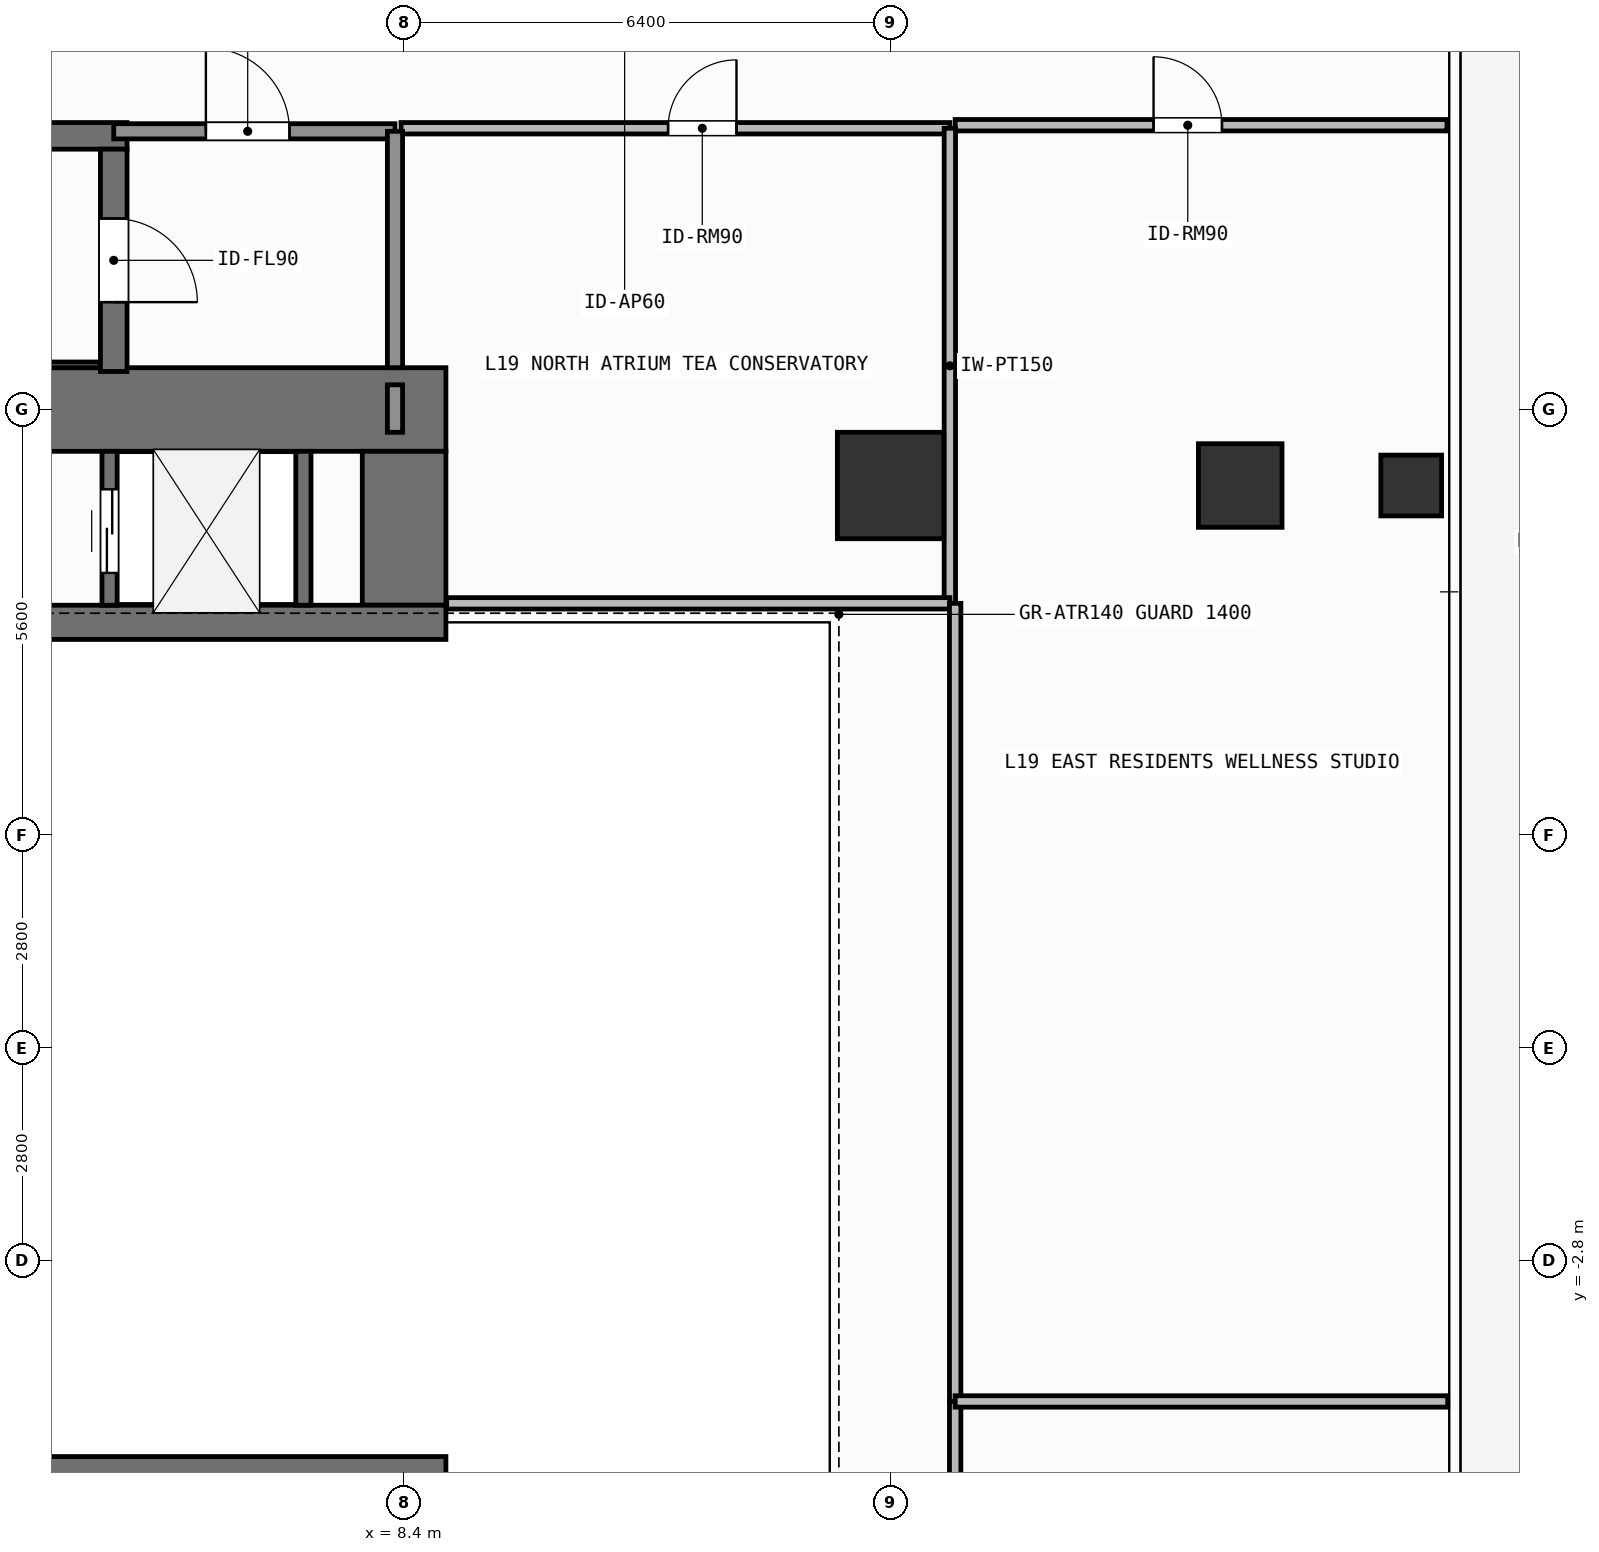
"""IFC4 building model, lengths in metres.
Left out: names, types, materials, properties, quantities, classifications, styles, units other than length and angle.
Written with IfcOpenShell. Run it as: python <this file> out.ifc"""

import sys

from ifc_helpers import new_model, si_unit, direction, frame, frame_2d, origin, origin_2d, place, context, subcontext, project, spatial, rectangle, hollow_rectangle, extrude, element, fill, save


model = new_model("IFC4")
c1 = context("Model", 3, precision=1e-05, world=origin(), true_north=direction((0.0, 1.0)))
c2 = subcontext(c1, "Body", "Model", "MODEL_VIEW")
j1 = project(units=[si_unit("LENGTHUNIT", "METRE"), si_unit("PLANEANGLEUNIT", "RADIAN")], contexts=[c1])
p1 = place(None, origin())
s1 = spatial("IfcSite", under=j1, at=p1, CompositionType="ELEMENT")
p2 = place(p1, origin())
s2 = spatial("IfcBuilding", under=s1, at=p2, CompositionType="ELEMENT")
p3 = place(p2, frame((0.0, 0.0, 73.5)))
s3 = spatial("IfcBuildingStorey", under=s2, at=p3, CompositionType="ELEMENT", Elevation=73.5)
p4 = place(p3, frame((-7.55, 8.4, 0.0), z_axis=(0.0, 0.0, 1.0), x_axis=(1.0, 0.0, 0.0)))
e1 = element("IfcWall", 1, at=p4, inside=s3, PredefinedType="SHEAR", context=c2, shape_type="SweptSolid", body=[
    extrude(rectangle(XDim=16.5, YDim=1.1, at=frame_2d((8.25, 0.0))), origin(), (0.0, 0.0, 1.0), 3.9),
])
p5 = place(p3, frame((8.4, 5.825, 0.0), z_axis=(0.0, 0.0, 1.0), x_axis=(0.0, 1.0, 0.0)))
e2 = element("IfcWall", 2, at=p5, inside=s3, PredefinedType="SHEAR", context=c2, shape_type="SweptSolid", body=[
    extrude(rectangle(XDim=2.025, YDim=1.1, at=frame_2d((1.013, 0.0))), origin(), (0.0, 0.0, 1.0), 3.9),
])
for number, where, z_axis, x_axis in (
    (3, (3.045, -5.6, 0.0), (0.0, 0.0, 1.0), (1.0, 0.0, 0.0)),
    (4, (3.045, 5.6, 0.0), (0.0, 0.0, 1.0), (1.0, 0.0, 0.0)),
):
    element("IfcWall", number, at=place(p3, frame(where, z_axis=z_axis, x_axis=x_axis)), inside=s3, PredefinedType="SHEAR", context=c2, shape_type="SweptSolid", body=[
        extrude(rectangle(XDim=5.905, YDim=0.45, at=frame_2d((2.953, 0.0))), origin(), (0.0, 0.0, 1.0), 3.9),
    ])
p6 = place(p3, frame((-2.555, 12.0, 0.0), z_axis=(0.0, 0.0, 1.0), x_axis=(1.0, 0.0, 0.0)))
e5 = element("IfcWall", 5, at=p6, inside=s3, PredefinedType="SHEAR", context=c2, shape_type="SweptSolid", body=[
    extrude(rectangle(XDim=7.31, YDim=0.35, at=frame_2d((3.655, 0.0))), origin(), (0.0, 0.0, 1.0), 3.9),
])
p7 = place(p3, frame((-2.2, 8.988, 0.0), z_axis=(0.0, 0.0, 1.0), x_axis=(1.0, 0.0, 0.0)))
e6 = element("IfcWall", 6, at=p7, inside=s3, PredefinedType="SHEAR", context=c2, shape_type="SweptSolid", body=[
    extrude(rectangle(XDim=6.6, YDim=0.075, at=frame_2d((3.3, 0.0))), origin(), (0.0, 0.0, 1.0), 3.9),
])
p8 = place(p3, frame((4.58, 11.825, 0.0), z_axis=(0.0, 0.0, 1.0), x_axis=(0.0, -1.0, 0.0)))
e7 = element("IfcWall", 7, at=p8, inside=s3, PredefinedType="SHEAR", context=c2, shape_type="SweptSolid", body=[
    extrude(rectangle(XDim=2.925, YDim=0.35, at=frame_2d((1.462, 0.0))), origin(), (0.0, 0.0, 1.0), 3.9),
])
p9 = place(p8, frame((0.913, 0.0, 0.0)))
e8 = element("IfcOpeningElement", 8, at=p9, cuts=e7, PredefinedType="OPENING", context=c2, shape_type="SweptSolid", body=[
    extrude(rectangle(XDim=1.1, YDim=2.15, at=frame_2d((0.55, 1.075))), frame((0.0, 0.185, 0.0), z_axis=(0.0, -1.0, 0.0), x_axis=(1.0, 0.0, 0.0)), (0.0, 0.0, 1.0), 0.37),
])
p10 = place(p3, frame((14.8, 7.4, 0.0), z_axis=(0.0, 0.0, 1.0), x_axis=(1.0, 0.0, 0.0)))
e9 = element("IfcColumn", 9, at=p10, inside=s3, PredefinedType="COLUMN", context=c2, shape_type="SweptSolid", body=[
    extrude(rectangle(XDim=1.4, YDim=1.4, at=origin_2d()), origin(), (0.0, 0.0, 1.0), 3.9),
])
p11 = place(p3, frame((19.4, 7.4, 0.0), z_axis=(0.0, 0.0, 1.0), x_axis=(1.0, 0.0, 0.0)))
e10 = element("IfcColumn", 10, at=p11, inside=s3, PredefinedType="COLUMN", context=c2, shape_type="SweptSolid", body=[
    extrude(rectangle(XDim=1.1, YDim=1.1, at=origin_2d()), origin(), (0.0, 0.0, 1.0), 3.9),
])
p12 = place(p3, frame((21.65, 7.4, 0.0), z_axis=(0.0, 0.0, 1.0), x_axis=(1.0, 0.0, 0.0)))
e11 = element("IfcColumn", 11, at=p12, inside=s3, PredefinedType="COLUMN", context=c2, shape_type="SweptSolid", body=[
    extrude(hollow_rectangle(XDim=0.8, YDim=0.8, WallThickness=0.036, at=origin_2d()), origin(), (0.0, 0.0, 1.0), 3.9),
])
p13 = place(p3, frame((4.525, 5.825, 0.0), z_axis=(0.0, 0.0, 1.0), x_axis=(0.0, 1.0, 0.0)))
e12 = element("IfcWall", 12, at=p13, inside=s3, PredefinedType="SHEAR", context=c2, shape_type="SweptSolid", body=[
    extrude(rectangle(XDim=2.025, YDim=0.2, at=frame_2d((1.013, 0.0))), origin(), (0.0, 0.0, 1.0), 3.6),
])
p14 = place(p13, frame((0.425, 0.0, 0.0)))
e13 = element("IfcOpeningElement", 13, at=p14, cuts=e12, PredefinedType="OPENING", context=c2, shape_type="SweptSolid", body=[
    extrude(rectangle(XDim=1.1, YDim=2.2, at=frame_2d((0.55, 1.1))), frame((0.0, 0.11, 0.0), z_axis=(0.0, -1.0, 0.0), x_axis=(1.0, 0.0, 0.0)), (0.0, 0.0, 1.0), 0.22),
])
p15 = place(p3, frame((7.075, 5.825, 0.0), z_axis=(0.0, 0.0, 1.0), x_axis=(0.0, 1.0, 0.0)))
e14 = element("IfcWall", 14, at=p15, inside=s3, PredefinedType="SHEAR", context=c2, shape_type="SweptSolid", body=[
    extrude(rectangle(XDim=2.025, YDim=0.2, at=frame_2d((1.013, 0.0))), origin(), (0.0, 0.0, 1.0), 3.6),
])
p16 = place(p3, frame((4.58, 12.06, 0.0), z_axis=(0.0, 0.0, 1.0), x_axis=(1.0, 0.0, 0.0)))
e15 = element("IfcWall", 15, at=p16, inside=s3, PredefinedType="SOLIDWALL", context=c2, shape_type="SweptSolid", body=[
    extrude(rectangle(XDim=3.7, YDim=0.2, at=frame_2d((1.85, 0.0))), origin(), (0.0, 0.0, 1.0), 3.6),
])
p17 = place(p16, frame((1.212, 0.0, 0.0)))
e16 = element("IfcOpeningElement", 16, at=p17, cuts=e15, PredefinedType="OPENING", context=c2, shape_type="SweptSolid", body=[
    extrude(rectangle(XDim=1.1, YDim=2.15, at=frame_2d((0.55, 1.075))), frame((0.0, 0.11, 0.0), z_axis=(0.0, -1.0, 0.0), x_axis=(1.0, 0.0, 0.0)), (0.0, 0.0, 1.0), 0.22),
])
p18 = place(p3, frame((8.36, 12.1, 0.0), z_axis=(0.0, 0.0, 1.0), x_axis=(1.0, 0.0, 0.0)))
e17 = element("IfcWall", 17, at=p18, inside=s3, PredefinedType="PARTITIONING", context=c2, shape_type="SweptSolid", body=[
    extrude(rectangle(XDim=7.22, YDim=0.15, at=frame_2d((3.61, 0.0))), origin(), (0.0, 0.0, 1.0), 3.6),
])
p19 = place(p18, frame((3.513, 0.0, 0.0)))
e18 = element("IfcOpeningElement", 18, at=p19, cuts=e17, PredefinedType="OPENING", context=c2, shape_type="SweptSolid", body=[
    extrude(rectangle(XDim=0.9, YDim=2.1, at=frame_2d((0.45, 1.05))), frame((0.0, 0.085, 0.0), z_axis=(0.0, -1.0, 0.0), x_axis=(1.0, 0.0, 0.0)), (0.0, 0.0, 1.0), 0.17),
])
p20 = place(p3, frame((15.65, 12.14, 0.0), z_axis=(0.0, 0.0, 1.0), x_axis=(1.0, 0.0, 0.0)))
e19 = element("IfcWall", 19, at=p20, inside=s3, PredefinedType="PARTITIONING", context=c2, shape_type="SweptSolid", body=[
    extrude(rectangle(XDim=6.47, YDim=0.15, at=frame_2d((3.235, 0.0))), origin(), (0.0, 0.0, 1.0), 3.6),
])
p21 = place(p20, frame((2.61, 0.0, 0.0)))
e20 = element("IfcOpeningElement", 20, at=p21, cuts=e19, PredefinedType="OPENING", context=c2, shape_type="SweptSolid", body=[
    extrude(rectangle(XDim=0.9, YDim=2.1, at=frame_2d((0.45, 1.05))), frame((0.0, 0.085, 0.0), z_axis=(0.0, -1.0, 0.0), x_axis=(1.0, 0.0, 0.0)), (0.0, 0.0, 1.0), 0.17),
])
p22 = place(p3, frame((8.28, 8.95, 0.0), z_axis=(0.0, 0.0, 1.0), x_axis=(0.0, 1.0, 0.0)))
e21 = element("IfcWall", 21, at=p22, inside=s3, PredefinedType="SOLIDWALL", context=c2, shape_type="SweptSolid", body=[
    extrude(rectangle(XDim=3.11, YDim=0.2, at=frame_2d((1.555, 0.0))), origin(), (0.0, 0.0, 1.0), 3.6),
])
p23 = place(p3, frame((8.28, 8.1, 0.0), z_axis=(0.0, 0.0, 1.0), x_axis=(0.0, 1.0, 0.0)))
e22 = element("IfcWall", 22, at=p23, inside=s3, PredefinedType="SOLIDWALL", context=c2, shape_type="SweptSolid", body=[
    extrude(rectangle(XDim=0.625, YDim=0.2, at=frame_2d((0.312, 0.0))), origin(), (0.0, 0.0, 1.0), 3.6),
])
p24 = place(p3, frame((15.58, 5.85, 0.0), z_axis=(0.0, 0.0, 1.0), x_axis=(0.0, 1.0, 0.0)))
e23 = element("IfcWall", 23, at=p24, inside=s3, PredefinedType="PARTITIONING", context=c2, shape_type="SweptSolid", body=[
    extrude(rectangle(XDim=6.25, YDim=0.15, at=frame_2d((3.125, 0.0))), origin(), (0.0, 0.0, 1.0), 3.6),
])
p25 = place(p3, frame((8.96, 5.85, 0.0), z_axis=(0.0, 0.0, 1.0), x_axis=(1.0, 0.0, 0.0)))
e24 = element("IfcWall", 24, at=p25, inside=s3, PredefinedType="PARTITIONING", context=c2, shape_type="SweptSolid", body=[
    extrude(rectangle(XDim=6.62, YDim=0.15, at=frame_2d((3.31, 0.0))), origin(), (0.0, 0.0, 1.0), 3.6),
])
p26 = place(p3, frame((15.65, -5.85, 0.0), z_axis=(0.0, 0.0, 1.0), x_axis=(0.0, 1.0, 0.0)))
e25 = element("IfcWall", 25, at=p26, inside=s3, PredefinedType="PARTITIONING", context=c2, shape_type="SweptSolid", body=[
    extrude(rectangle(XDim=1.2, YDim=0.15, at=frame_2d((0.6, 0.0))), origin(), (0.0, 0.0, 1.0), 3.6),
])
p27 = place(p3, frame((15.65, -4.65, 0.0), z_axis=(0.0, 0.0, 1.0), x_axis=(0.0, 1.0, 0.0)))
e26 = element("IfcWall", 26, at=p27, inside=s3, PredefinedType="PARTITIONING", context=c2, shape_type="SweptSolid", body=[
    extrude(rectangle(XDim=10.5, YDim=0.15, at=frame_2d((5.25, 0.0))), origin(), (0.0, 0.0, 1.0), 3.6),
])
p28 = place(p3, frame((15.65, -4.65, 0.0), z_axis=(0.0, 0.0, 1.0), x_axis=(1.0, 0.0, 0.0)))
e27 = element("IfcWall", 27, at=p28, inside=s3, PredefinedType="PARTITIONING", context=c2, shape_type="SweptSolid", body=[
    extrude(rectangle(XDim=6.48, YDim=0.15, at=frame_2d((3.24, 0.0))), origin(), (0.0, 0.0, 1.0), 3.6),
])
p29 = place(p14, origin())
e28 = element("IfcDoor", 28, at=p29, inside=s3, OperationType="SLIDING_TO_LEFT", PredefinedType="DOOR", context=c2, shape_type="SweptSolid", body=[
    extrude(rectangle(XDim=1.1, YDim=2.2, at=frame_2d((0.55, 1.1))), frame((0.0, 0.025, 0.0), z_axis=(0.0, -1.0, 0.0), x_axis=(1.0, 0.0, 0.0)), (0.0, 0.0, 1.0), 0.05),
])
fill(e13, e28)
p30 = place(p9, origin())
e29 = element("IfcDoor", 29, at=p30, inside=s3, OperationType="SINGLE_SWING_RIGHT", PredefinedType="DOOR", context=c2, shape_type="SweptSolid", body=[
    extrude(rectangle(XDim=1.1, YDim=2.15, at=frame_2d((0.55, 1.075))), frame((0.0, 0.025, 0.0), z_axis=(0.0, -1.0, 0.0), x_axis=(1.0, 0.0, 0.0)), (0.0, 0.0, 1.0), 0.05),
])
fill(e8, e29)
p31 = place(p17, origin())
e30 = element("IfcDoor", 30, at=p31, inside=s3, OperationType="SINGLE_SWING_LEFT", PredefinedType="DOOR", context=c2, shape_type="SweptSolid", body=[
    extrude(rectangle(XDim=1.1, YDim=2.15, at=frame_2d((0.55, 1.075))), frame((0.0, 0.025, 0.0), z_axis=(0.0, -1.0, 0.0), x_axis=(1.0, 0.0, 0.0)), (0.0, 0.0, 1.0), 0.05),
])
fill(e16, e30)
p32 = place(p19, origin())
e31 = element("IfcDoor", 31, at=p32, inside=s3, OperationType="SINGLE_SWING_RIGHT", PredefinedType="DOOR", context=c2, shape_type="SweptSolid", body=[
    extrude(rectangle(XDim=0.9, YDim=2.1, at=frame_2d((0.45, 1.05))), frame((0.0, 0.025, 0.0), z_axis=(0.0, -1.0, 0.0), x_axis=(1.0, 0.0, 0.0)), (0.0, 0.0, 1.0), 0.05),
])
fill(e18, e31)
p33 = place(p21, origin())
e32 = element("IfcDoor", 32, at=p33, inside=s3, OperationType="SINGLE_SWING_LEFT", PredefinedType="DOOR", context=c2, shape_type="SweptSolid", body=[
    extrude(rectangle(XDim=0.9, YDim=2.1, at=frame_2d((0.45, 1.05))), frame((0.0, 0.025, 0.0), z_axis=(0.0, -1.0, 0.0), x_axis=(1.0, 0.0, 0.0)), (0.0, 0.0, 1.0), 0.05),
])
fill(e20, e32)
save(model, sys.argv[1])
